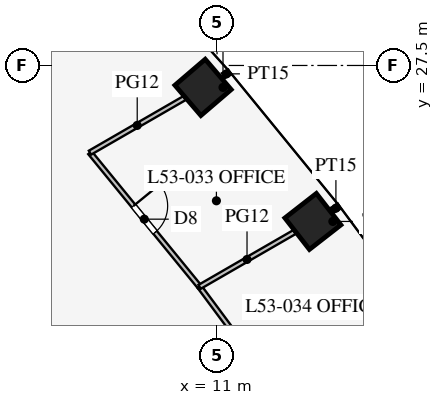
"""IFC4 building model, lengths in metres.
Left out: names, types, materials, properties, quantities, classifications, styles, units other than length and angle.
Written with IfcOpenShell. Run it as: python <this file> out.ifc"""

import sys

from ifc_helpers import new_model, si_unit, direction, frame, frame_2d, origin, origin_2d, place, context, subcontext, project, spatial, rectangle, extrude, element, fill, save


model = new_model("IFC4")
c1 = context("Model", 3, precision=1e-05, world=origin(), true_north=direction((0.0, 1.0)))
c2 = subcontext(c1, "Body", "Model", "MODEL_VIEW")
j1 = project(units=[si_unit("LENGTHUNIT", "METRE"), si_unit("PLANEANGLEUNIT", "RADIAN")], contexts=[c1])
p1 = place(None, origin())
s1 = spatial("IfcSite", under=j1, at=p1, CompositionType="ELEMENT")
p2 = place(p1, origin())
s2 = spatial("IfcBuilding", under=s1, at=p2, CompositionType="ELEMENT")
p3 = place(p2, frame((0.0, 0.0, 231.7)))
s3 = spatial("IfcBuildingStorey", under=s2, at=p3, CompositionType="ELEMENT", Elevation=231.7)
for number, where, z_axis, x_axis in (
    (1, (13.522, 23.396, 0.0), (0.0, 0.0, 1.0), (-0.615, 0.789, 0.0)),
    (2, (10.632, 26.923, 0.0), (0.0, 0.0, 1.0), (-0.651, 0.759, 0.0)),
):
    element("IfcColumn", number, at=place(p3, frame(where, z_axis=z_axis, x_axis=x_axis)), inside=s3, PredefinedType="COLUMN", context=c2, shape_type="SweptSolid", body=[
        extrude(rectangle(XDim=1.05, YDim=1.05, at=origin_2d()), origin(), (0.0, 0.0, 1.0), 4.2),
    ])
p4 = place(p3, frame((14.039, 23.694, 0.0), z_axis=(0.0, 0.0, 1.0), x_axis=(0.866047486323, 0.49996174997, 0.0)))
e3 = element("IfcWall", 3, at=p4, inside=s3, PredefinedType="PARTITIONING", context=c2, shape_type="SweptSolid", body=[
    extrude(rectangle(XDim=0.206, YDim=0.15, at=frame_2d((0.103, 0.0))), origin(), (0.0, 0.0, 1.0), 2.9),
])
p5 = place(p3, frame((11.166, 27.231, 0.0), z_axis=(0.0, 0.0, 1.0), x_axis=(0.866439280089, 0.499282459054, 0.0)))
e4 = element("IfcWall", 4, at=p5, inside=s3, PredefinedType="PARTITIONING", context=c2, shape_type="SweptSolid", body=[
    extrude(rectangle(XDim=0.192, YDim=0.15, at=frame_2d((0.096, 0.0))), origin(), (0.0, 0.0, 1.0), 2.9),
])
p6 = place(p3, frame((10.541, 21.674, 0.0), z_axis=(0.0, 0.0, 1.0), x_axis=(-0.632733183181, 0.774369885069, 0.0)))
e5 = element("IfcWall", 5, at=p6, inside=s3, PredefinedType="PARTITIONING", context=c2, shape_type="SweptSolid", body=[
    extrude(rectangle(XDim=4.559, YDim=0.12, at=frame_2d((2.28, 0.0))), origin(), (0.0, 0.0, 1.0), 2.9),
])
p7 = place(p6, frame((1.85, 0.0, 0.15)))
e6 = element("IfcOpeningElement", 6, at=p7, cuts=e5, PredefinedType="OPENING", context=c2, shape_type="SweptSolid", body=[
    extrude(rectangle(XDim=0.9, YDim=2.1, at=frame_2d((0.45, 1.05))), frame((0.0, 0.07, 0.0), z_axis=(0.0, -1.0, 0.0), x_axis=(1.0, 0.0, 0.0)), (0.0, 0.0, 1.0), 0.14),
])
p8 = place(p3, frame((13.242, 18.037, 0.0), z_axis=(0.0, 0.0, 1.0), x_axis=(-0.596173167565, 0.802855873912, 0.0)))
e7 = element("IfcWall", 7, at=p8, inside=s3, PredefinedType="PARTITIONING", context=c2, shape_type="SweptSolid", body=[
    extrude(rectangle(XDim=4.53, YDim=0.12, at=frame_2d((2.265, 0.0))), origin(), (0.0, 0.0, 1.0), 2.9),
])
p9 = place(p8, frame((1.8, 0.0, 0.15)))
e8 = element("IfcOpeningElement", 8, at=p9, cuts=e7, PredefinedType="OPENING", context=c2, shape_type="SweptSolid", body=[
    extrude(rectangle(XDim=0.9, YDim=2.1, at=frame_2d((0.45, 1.05))), frame((0.0, 0.07, 0.0), z_axis=(0.0, -1.0, 0.0), x_axis=(1.0, 0.0, 0.0)), (0.0, 0.0, 1.0), 0.14),
])
p10 = place(p3, frame((10.541, 21.674, 0.0), z_axis=(0.0, 0.0, 1.0), x_axis=(0.866019137337, 0.500010853648, 0.0)))
e9 = element("IfcWall", 9, at=p10, inside=s3, PredefinedType="PARTITIONING", context=c2, shape_type="SweptSolid", body=[
    extrude(rectangle(XDim=2.882, YDim=0.12, at=frame_2d((1.441, 0.0))), origin(), (0.0, 0.0, 1.0), 2.9),
])
p11 = place(p3, frame((7.656, 25.205, 0.0), z_axis=(0.0, 0.0, 1.0), x_axis=(0.86598453209, 0.500070785171, 0.0)))
e10 = element("IfcWall", 10, at=p11, inside=s3, PredefinedType="PARTITIONING", context=c2, shape_type="SweptSolid", body=[
    extrude(rectangle(XDim=2.872, YDim=0.12, at=frame_2d((1.436, 0.0))), origin(), (0.0, 0.0, 1.0), 2.9),
])
p12 = place(p7, frame((0.9, 0.0, 0.0), z_axis=(0.0, 0.0, 1.0), x_axis=(-1.0, 0.0, 0.0)))
e11 = element("IfcDoor", 11, at=p12, inside=s3, OperationType="SINGLE_SWING_LEFT", PredefinedType="DOOR", context=c2, shape_type="SweptSolid", body=[
    extrude(rectangle(XDim=0.9, YDim=2.1, at=frame_2d((0.45, 1.05))), frame((0.0, 0.025, 0.0), z_axis=(0.0, -1.0, 0.0), x_axis=(1.0, 0.0, 0.0)), (0.0, 0.0, 1.0), 0.05),
])
fill(e6, e11)
save(model, sys.argv[1])
